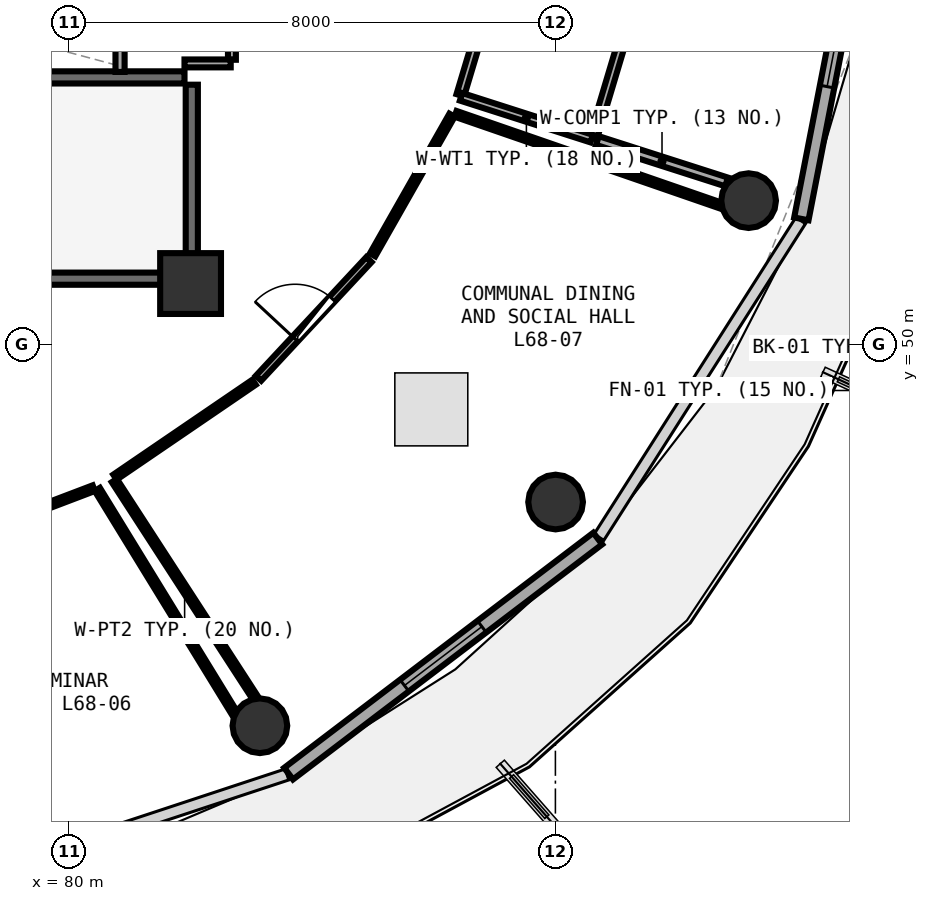
"""IFC4 building model, lengths in metres.
Left out: names, types, materials, properties, quantities, classifications, styles, units other than length and angle.
Written with IfcOpenShell. Run it as: python <this file> out.ifc"""

import sys

from ifc_helpers import new_model, si_unit, direction, frame, frame_2d, origin, origin_2d, place, context, subcontext, project, spatial, rectangle, circle, extrude, element, fill, save


model = new_model("IFC4")
c1 = context("Model", 3, precision=1e-05, world=origin(), true_north=direction((0.0, 1.0)))
c2 = subcontext(c1, "Body", "Model", "MODEL_VIEW")
j1 = project(units=[si_unit("LENGTHUNIT", "METRE"), si_unit("PLANEANGLEUNIT", "RADIAN")], contexts=[c1])
p1 = place(None, origin())
s1 = spatial("IfcSite", under=j1, at=p1, CompositionType="ELEMENT")
p2 = place(p1, origin())
s2 = spatial("IfcBuilding", under=s1, at=p2, CompositionType="ELEMENT")
p3 = place(p2, frame((0.0, 0.0, 267.45)))
s3 = spatial("IfcBuildingStorey", under=s2, at=p3, CompositionType="ELEMENT", Elevation=267.45)
p4 = place(p3, frame((82.0, 51.0, 0.0), z_axis=(0.0, 0.0, 1.0), x_axis=(1.0, 0.0, 0.0)))
e1 = element("IfcColumn", 1, at=p4, inside=s3, PredefinedType="PILASTER", context=c2, shape_type="SweptSolid", body=[
    extrude(rectangle(XDim=1.0, YDim=1.0, at=origin_2d()), origin(), (0.0, 0.0, 1.0), 3.75),
])
for number, where, z_axis, x_axis in (
    (2, (83.14, 43.728, 0.0), (0.0, 0.0, 1.0), (1.0, 0.0, 0.0)),
    (3, (88.003, 47.407, 0.0), (0.0, 0.0, 1.0), (1.0, 0.0, 0.0)),
    (4, (91.177, 52.364, 0.0), (0.0, 0.0, 1.0), (1.0, 0.0, 0.0)),
):
    element("IfcColumn", number, at=place(p3, frame(where, z_axis=z_axis, x_axis=x_axis)), inside=s3, PredefinedType="COLUMN", context=c2, shape_type="SweptSolid", body=[
        extrude(circle(Radius=0.45, at=origin_2d()), origin(), (0.0, 0.0, 1.0), 3.75),
    ])
p5 = place(p3, frame((83.612, 42.94, 0.0), z_axis=(0.0, 0.0, 1.0), x_axis=(0.796010444211, 0.605282886514, 0.0)))
e5 = element("IfcWall", 5, at=p5, inside=s3, PredefinedType="SOLIDWALL", context=c2, shape_type="SweptSolid", body=[
    extrude(rectangle(XDim=6.387, YDim=0.24, at=frame_2d((3.194, 0.0))), origin(), (0.0, 0.0, 1.0), 3.475),
])
p6 = place(p5, frame((2.394, 0.0, 0.85)))
e6 = element("IfcOpeningElement", 6, at=p6, cuts=e5, PredefinedType="OPENING", context=c2, shape_type="SweptSolid", body=[
    extrude(rectangle(XDim=1.6, YDim=1.45, at=frame_2d((0.8, 0.725))), frame((0.0, 0.13, 0.0), z_axis=(0.0, -1.0, 0.0), x_axis=(1.0, 0.0, 0.0)), (0.0, 0.0, 1.0), 0.26),
])
p7 = place(p3, frame((92.045, 52.063, 0.0), z_axis=(0.0, 0.0, 1.0), x_axis=(0.190969309115, 0.981596008028, 0.0)))
e7 = element("IfcWall", 7, at=p7, inside=s3, PredefinedType="SOLIDWALL", context=c2, shape_type="SweptSolid", body=[
    extrude(rectangle(XDim=6.033, YDim=0.24, at=frame_2d((3.017, 0.0))), origin(), (0.0, 0.0, 1.0), 3.475),
])
p8 = place(p7, frame((2.216, 0.0, 0.85)))
e8 = element("IfcOpeningElement", 8, at=p8, cuts=e7, PredefinedType="OPENING", context=c2, shape_type="SweptSolid", body=[
    extrude(rectangle(XDim=1.6, YDim=1.45, at=frame_2d((0.8, 0.725))), frame((0.0, 0.13, 0.0), z_axis=(0.0, -1.0, 0.0), x_axis=(1.0, 0.0, 0.0)), (0.0, 0.0, 1.0), 0.26),
])
p9 = place(p3, frame((74.0, 51.08, 0.0), z_axis=(0.0, 0.0, 1.0), x_axis=(1.0, 0.0, 0.0)))
e9 = element("IfcWall", 9, at=p9, inside=s3, PredefinedType="SHEAR", context=c2, shape_type="SweptSolid", body=[
    extrude(rectangle(XDim=7.9, YDim=0.2, at=frame_2d((3.95, 0.0))), origin(), (0.0, 0.0, 1.0), 3.49),
])
p10 = place(p9, frame((1.12, 0.0, 0.0)))
e10 = element("IfcOpeningElement", 10, at=p10, cuts=e9, PredefinedType="OPENING", context=c2, shape_type="SweptSolid", body=[
    extrude(rectangle(XDim=1.05, YDim=2.1, at=frame_2d((0.525, 1.05))), frame((0.0, 0.11, 0.0), z_axis=(0.0, -1.0, 0.0), x_axis=(1.0, 0.0, 0.0)), (0.0, 0.0, 1.0), 0.22),
])
p11 = place(p3, frame((82.02, 51.2, 0.0), z_axis=(0.0, 0.0, 1.0), x_axis=(0.0, 1.0, 0.0)))
e11 = element("IfcWall", 11, at=p11, inside=s3, PredefinedType="SHEAR", context=c2, shape_type="SweptSolid", body=[
    extrude(rectangle(XDim=3.07, YDim=0.2, at=frame_2d((1.535, 0.0))), origin(), (0.0, 0.0, 1.0), 3.49),
])
p12 = place(p3, frame((81.9, 54.39, 0.0), z_axis=(0.0, 0.0, 1.0), x_axis=(-1.0, 0.0, 0.0)))
e12 = element("IfcWall", 12, at=p12, inside=s3, PredefinedType="SHEAR", context=c2, shape_type="SweptSolid", body=[
    extrude(rectangle(XDim=8.46, YDim=0.2, at=frame_2d((4.23, 0.0))), origin(), (0.0, 0.0, 1.0), 3.49),
])
p13 = place(p3, frame((80.84, 54.48, 0.0), z_axis=(0.0, 0.0, 1.0), x_axis=(0.0, 1.0, 0.0)))
e13 = element("IfcWall", 13, at=p13, inside=s3, PredefinedType="PARTITIONING", context=c2, shape_type="SweptSolid", body=[
    extrude(rectangle(XDim=2.29, YDim=0.15, at=frame_2d((1.145, 0.0))), origin(), (0.0, 0.0, 1.0), 3.48),
])
p14 = place(p3, frame((82.68, 54.68, 0.0), z_axis=(0.0, 0.0, 1.0), x_axis=(0.0, 1.0, 0.0)))
e14 = element("IfcWall", 14, at=p14, inside=s3, PredefinedType="PLUMBINGWALL", context=c2, shape_type="SweptSolid", body=[
    extrude(rectangle(XDim=2.21, YDim=0.13, at=frame_2d((1.105, 0.0))), origin(), (0.0, 0.0, 1.0), 3.48),
])
p15 = place(p14, frame((0.675, 0.0, 0.0)))
e15 = element("IfcOpeningElement", 15, at=p15, cuts=e14, PredefinedType="OPENING", context=c2, shape_type="SweptSolid", body=[
    extrude(rectangle(XDim=0.86, YDim=2.05, at=frame_2d((0.43, 1.025))), frame((0.0, 0.075, 0.0), z_axis=(0.0, -1.0, 0.0), x_axis=(1.0, 0.0, 0.0)), (0.0, 0.0, 1.0), 0.15),
])
p16 = place(p3, frame((83.118, 49.443, 0.0), z_axis=(0.0, 0.0, 1.0), x_axis=(0.681315269885, 0.731990097625, 0.0)))
e16 = element("IfcWall", 16, at=p16, inside=s3, PredefinedType="PARTITIONING", context=c2, shape_type="SweptSolid", body=[
    extrude(rectangle(XDim=2.664, YDim=0.12, at=frame_2d((1.332, 0.0))), origin(), (0.0, 0.0, 1.0), 3.075),
])
p17 = place(p16, frame((0.882, 0.0, 0.0)))
e17 = element("IfcOpeningElement", 17, at=p17, cuts=e16, PredefinedType="OPENING", context=c2, shape_type="SweptSolid", body=[
    extrude(rectangle(XDim=0.9, YDim=2.08, at=frame_2d((0.45, 1.04))), frame((0.0, 0.07, 0.0), z_axis=(0.0, -1.0, 0.0), x_axis=(1.0, 0.0, 0.0)), (0.0, 0.0, 1.0), 0.14),
])
p18 = place(p3, frame((81.9, 54.62, 0.0), z_axis=(0.0, 0.0, 1.0), x_axis=(1.0, 0.0, 0.0)))
e18 = element("IfcWall", 18, at=p18, inside=s3, PredefinedType="PLUMBINGWALL", context=c2, shape_type="SweptSolid", body=[
    extrude(rectangle(XDim=0.76, YDim=0.13, at=frame_2d((0.38, 0.0))), origin(), (0.0, 0.0, 1.0), 2.775),
])
p19 = place(p3, frame((77.763, 46.629, 0.0), z_axis=(0.0, 0.0, 1.0), x_axis=(0.934691278896, 0.355460564839, 0.0)))
e19 = element("IfcWall", 19, at=p19, inside=s3, PredefinedType="PARTITIONING", context=c2, shape_type="SweptSolid", body=[
    extrude(rectangle(XDim=2.829, YDim=0.1, at=frame_2d((1.415, 0.0))), origin(), (0.0, 0.0, 1.0), 3.48),
])
p20 = place(p3, frame((80.466, 47.615, 0.0), z_axis=(0.0, 0.0, 1.0), x_axis=(0.522784059663, -0.852465147066, 0.0)))
e20 = element("IfcWall", 20, at=p20, inside=s3, PredefinedType="PARTITIONING", context=c2, shape_type="SweptSolid", body=[
    extrude(rectangle(XDim=4.306, YDim=0.1, at=frame_2d((2.153, 0.0))), origin(), (0.0, 0.0, 1.0), 3.175),
])
p21 = place(p3, frame((80.757, 47.816, 0.0), z_axis=(0.0, 0.0, 1.0), x_axis=(0.826087380575, 0.563542047814, 0.0)))
e21 = element("IfcWall", 21, at=p21, inside=s3, PredefinedType="PARTITIONING", context=c2, shape_type="SweptSolid", body=[
    extrude(rectangle(XDim=2.768, YDim=0.1, at=frame_2d((1.384, 0.0))), origin(), (0.0, 0.0, 1.0), 3.075),
])
p22 = place(p3, frame((84.994, 51.472, 0.0), z_axis=(0.0, 0.0, 1.0), x_axis=(0.494277588427, 0.869304127207, 0.0)))
e22 = element("IfcWall", 22, at=p22, inside=s3, PredefinedType="PARTITIONING", context=c2, shape_type="SweptSolid", body=[
    extrude(rectangle(XDim=2.643, YDim=0.1, at=frame_2d((1.322, 0.0))), origin(), (0.0, 0.0, 1.0), 3.075),
])
p23 = place(p3, frame((86.358, 53.791, 0.0), z_axis=(0.0, 0.0, 1.0), x_axis=(0.945103281494, -0.326771766388, 0.0)))
e23 = element("IfcWall", 23, at=p23, inside=s3, PredefinedType="PARTITIONING", context=c2, shape_type="SweptSolid", body=[
    extrude(rectangle(XDim=4.604, YDim=0.1, at=frame_2d((2.302, 0.0))), origin(), (0.0, 0.0, 1.0), 3.075),
])
p24 = place(p3, frame((83.058, 44.196, 0.0), z_axis=(0.0, 0.0, 1.0), x_axis=(-0.544234825024, 0.838932926539, 0.0)))
e24 = element("IfcWall", 24, at=p24, inside=s3, PredefinedType="PARTITIONING", context=c2, shape_type="SweptSolid", body=[
    extrude(rectangle(XDim=4.249, YDim=0.1, at=frame_2d((2.125, 0.0))), origin(), (0.0, 0.0, 1.0), 3.075),
])
p25 = place(p3, frame((86.436, 54.096, 0.0), z_axis=(0.0, 0.0, 1.0), x_axis=(0.287308367232, 0.957838139833, 0.0)))
e25 = element("IfcWall", 25, at=p25, inside=s3, PredefinedType="PLUMBINGWALL", context=c2, shape_type="SweptSolid", body=[
    extrude(rectangle(XDim=1.7, YDim=0.13, at=frame_2d((0.85, 0.0))), origin(), (0.0, 0.0, 1.0), 3.48),
])
p26 = place(p3, frame((89.198, 55.322, 0.0), z_axis=(0.0, 0.0, 1.0), x_axis=(-0.286890981069, -0.957963237803, 0.0)))
e26 = element("IfcWall", 26, at=p26, inside=s3, PredefinedType="PLUMBINGWALL", context=c2, shape_type="SweptSolid", body=[
    extrude(rectangle(XDim=2.01, YDim=0.13, at=frame_2d((1.005, 0.0))), origin(), (0.0, 0.0, 1.0), 3.48),
])
p27 = place(p3, frame((88.597, 53.383, 0.0), z_axis=(0.0, 0.0, 1.0), x_axis=(-0.952372601519, 0.304936760454, 0.0)))
e27 = element("IfcWall", 27, at=p27, inside=s3, PredefinedType="PLUMBINGWALL", context=c2, shape_type="SweptSolid", body=[
    extrude(rectangle(XDim=2.255, YDim=0.13, at=frame_2d((1.128, 0.0))), origin(), (0.0, 0.0, 1.0), 3.175),
])
p28 = place(p3, frame((90.816, 52.671, 0.0), z_axis=(0.0, 0.0, 1.0), x_axis=(-0.952285550261, 0.305208503755, 0.0)))
e28 = element("IfcWall", 28, at=p28, inside=s3, PredefinedType="PARTITIONING", context=c2, shape_type="SweptSolid", body=[
    extrude(rectangle(XDim=2.231, YDim=0.15, at=frame_2d((1.115, 0.0))), origin(), (0.0, 0.0, 1.0), 3.235),
])
p29 = place(p6, origin())
e29 = element("IfcWindow", 29, at=p29, inside=s3, PartitioningType="SINGLE_PANEL", PredefinedType="WINDOW", context=c2, shape_type="SweptSolid", body=[
    extrude(rectangle(XDim=1.6, YDim=1.45, at=frame_2d((0.8, 0.725))), frame((0.0, 0.03, 0.0), z_axis=(0.0, -1.0, 0.0), x_axis=(1.0, 0.0, 0.0)), (0.0, 0.0, 1.0), 0.06),
])
fill(e6, e29)
p30 = place(p8, origin())
e30 = element("IfcWindow", 30, at=p30, inside=s3, PartitioningType="SINGLE_PANEL", PredefinedType="WINDOW", context=c2, shape_type="SweptSolid", body=[
    extrude(rectangle(XDim=1.6, YDim=1.45, at=frame_2d((0.8, 0.725))), frame((0.0, 0.03, 0.0), z_axis=(0.0, -1.0, 0.0), x_axis=(1.0, 0.0, 0.0)), (0.0, 0.0, 1.0), 0.06),
])
fill(e8, e30)
p31 = place(p17, origin())
e31 = element("IfcDoor", 31, at=p31, inside=s3, OperationType="SINGLE_SWING_LEFT", PredefinedType="DOOR", context=c2, shape_type="SweptSolid", body=[
    extrude(rectangle(XDim=0.9, YDim=2.08, at=frame_2d((0.45, 1.04))), frame((0.0, 0.025, 0.0), z_axis=(0.0, -1.0, 0.0), x_axis=(1.0, 0.0, 0.0)), (0.0, 0.0, 1.0), 0.05),
])
fill(e17, e31)
save(model, sys.argv[1])
